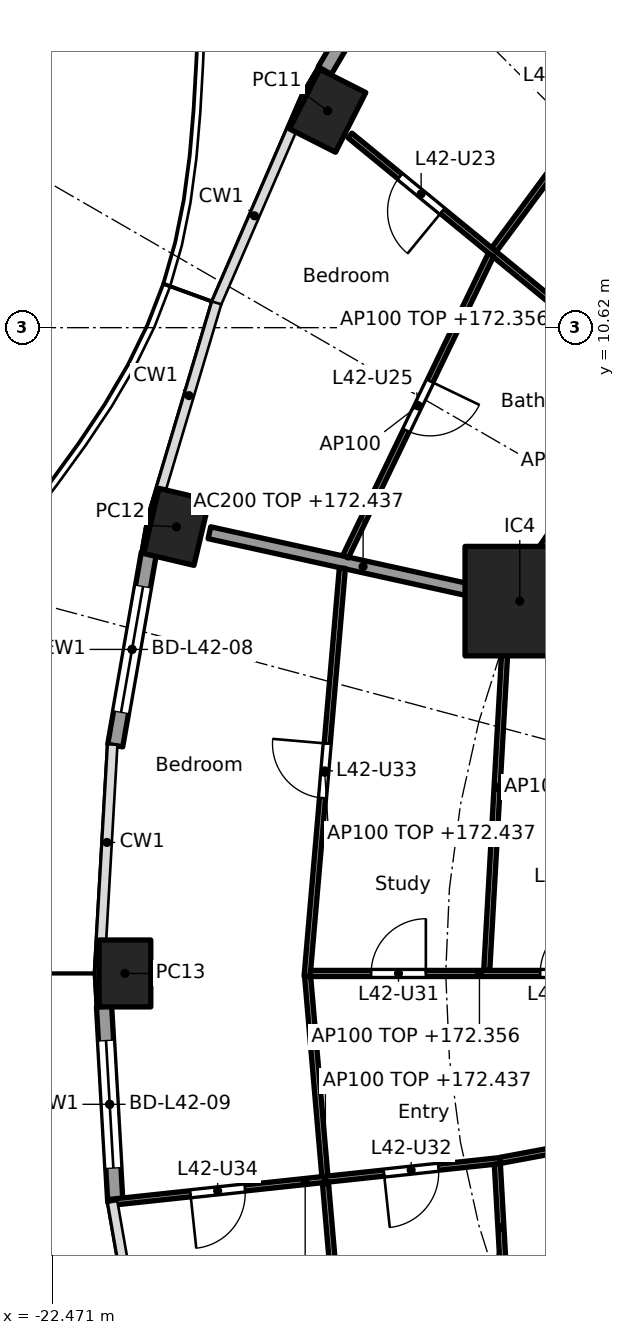
"""IFC4 building model, lengths in metres.
Left out: names, types, materials, properties, quantities, classifications, styles, units other than length and angle.
Written with IfcOpenShell. Run it as: python <this file> out.ifc"""

import sys

from ifc_helpers import new_model, si_unit, direction, frame, frame_2d, origin, origin_2d, place, context, subcontext, project, spatial, rectangle, hollow_rectangle, extrude, element, fill, save


model = new_model("IFC4")
c1 = context("Model", 3, precision=1e-05, world=origin(), true_north=direction((0.0, 1.0)))
c2 = subcontext(c1, "Body", "Model", "MODEL_VIEW")
j1 = project(units=[si_unit("LENGTHUNIT", "METRE"), si_unit("PLANEANGLEUNIT", "RADIAN")], contexts=[c1])
p1 = place(None, origin())
s1 = spatial("IfcSite", under=j1, at=p1, CompositionType="ELEMENT")
p2 = place(p1, origin())
s2 = spatial("IfcBuilding", under=s1, at=p2, CompositionType="ELEMENT")
p3 = place(p2, frame((0.0, 0.0, 169.6)))
s3 = spatial("IfcBuildingStorey", under=s2, at=p3, CompositionType="ELEMENT", Elevation=169.6)
for number, where, z_axis, x_axis in (
    (1, (-17.942, 14.188, 0.0), (0.0, 0.0, 1.0), (-0.452, -0.892, 0.0)),
    (2, (-20.427, 7.344, 0.0), (0.0, 0.0, 1.0), (-0.229, -0.973, 0.0)),
    (3, (-21.275, 0.0, 0.0), (0.0, 0.0, 1.0), (0.0, -1.0, 0.0)),
):
    element("IfcColumn", number, at=place(p3, frame(where, z_axis=z_axis, x_axis=x_axis)), inside=s3, PredefinedType="COLUMN", context=c2, shape_type="SweptSolid", body=[
        extrude(hollow_rectangle(XDim=1.1, YDim=0.85, WallThickness=0.036, at=origin_2d()), origin(), (0.0, 0.0, 1.0), 3.7),
    ])
p4 = place(p3, frame((-14.782, 6.123, 0.0), z_axis=(0.0, 0.0, 1.0), x_axis=(1.0, 0.0, 0.0)))
e4 = element("IfcColumn", 4, at=p4, inside=s3, PredefinedType="COLUMN", context=c2, shape_type="SweptSolid", body=[
    extrude(rectangle(XDim=1.8, YDim=1.8, at=origin_2d()), origin(), (0.0, 0.0, 1.0), 3.7),
])
p5 = place(p3, frame((-17.989, 14.848, 0.0), z_axis=(0.0, 0.0, 1.0), x_axis=(0.506309086483, 0.862352079458, 0.0)))
e5 = element("IfcWall", 5, at=p5, inside=s3, PredefinedType="SOLIDWALL", context=c2, shape_type="SweptSolid", body=[
    extrude(rectangle(XDim=3.092, YDim=0.25, at=frame_2d((1.546, 0.0))), origin(), (0.0, 0.0, 1.0), 3.44),
])
p6 = place(p5, frame((0.496, 0.0, 0.0)))
e6 = element("IfcOpeningElement", 6, at=p6, cuts=e5, PredefinedType="OPENING", context=c2, shape_type="SweptSolid", body=[
    extrude(rectangle(XDim=2.1, YDim=2.4, at=frame_2d((1.05, 1.2))), frame((0.0, 0.135, 0.0), z_axis=(0.0, -1.0, 0.0), x_axis=(1.0, 0.0, 0.0)), (0.0, 0.0, 1.0), 0.27),
])
p7 = place(p3, frame((-21.435, 3.747, 0.0), z_axis=(0.0, 0.0, 1.0), x_axis=(0.172223552479, 0.98505789067, 0.0)))
e7 = element("IfcWall", 7, at=p7, inside=s3, PredefinedType="SOLIDWALL", context=c2, shape_type="SweptSolid", body=[
    extrude(rectangle(XDim=3.211, YDim=0.25, at=frame_2d((1.605, 0.0))), origin(), (0.0, 0.0, 1.0), 3.44),
])
p8 = place(p7, frame((0.555, 0.0, 0.0)))
e8 = element("IfcOpeningElement", 8, at=p8, cuts=e7, PredefinedType="OPENING", context=c2, shape_type="SweptSolid", body=[
    extrude(rectangle(XDim=2.1, YDim=2.4, at=frame_2d((1.05, 1.2))), frame((0.0, 0.135, 0.0), z_axis=(0.0, -1.0, 0.0), x_axis=(1.0, 0.0, 0.0)), (0.0, 0.0, 1.0), 0.27),
])
p9 = place(p3, frame((-21.433, -3.762, 0.0), z_axis=(0.0, 0.0, 1.0), x_axis=(-0.057532692854, 0.998343622834, 0.0)))
e9 = element("IfcWall", 9, at=p9, inside=s3, PredefinedType="SOLIDWALL", context=c2, shape_type="SweptSolid", body=[
    extrude(rectangle(XDim=3.225, YDim=0.25, at=frame_2d((1.613, 0.0))), origin(), (0.0, 0.0, 1.0), 3.44),
])
p10 = place(p9, frame((0.562, 0.0, 0.0)))
e10 = element("IfcOpeningElement", 10, at=p10, cuts=e9, PredefinedType="OPENING", context=c2, shape_type="SweptSolid", body=[
    extrude(rectangle(XDim=2.1, YDim=2.4, at=frame_2d((1.05, 1.2))), frame((0.0, 0.135, 0.0), z_axis=(0.0, -1.0, 0.0), x_axis=(1.0, 0.0, 0.0)), (0.0, 0.0, 1.0), 0.27),
])
p11 = place(p3, frame((-12.657, 5.243, 0.0), z_axis=(0.0, 0.0, 1.0), x_axis=(-0.923859888513, 0.38273085373, 0.0)))
e11 = element("IfcWall", 11, at=p11, inside=s3, PredefinedType="PARTITIONING", context=c2, shape_type="SweptSolid", body=[
    extrude(rectangle(XDim=2.199, YDim=0.2, at=frame_2d((1.1, 0.0))), origin(), (0.0, 0.0, 1.0), 3.44),
])
p12 = place(p3, frame((-14.831, 6.134, 0.0), z_axis=(0.0, 0.0, 1.0), x_axis=(-0.976568396888, 0.215207263354, 0.0)))
e12 = element("IfcWall", 12, at=p12, inside=s3, PredefinedType="PARTITIONING", context=c2, shape_type="SweptSolid", body=[
    extrude(rectangle(XDim=5.177, YDim=0.2, at=frame_2d((2.588, 0.0))), origin(), (0.0, 0.0, 1.0), 2.837),
])
p13 = place(p3, frame((-11.773, 16.542, 0.0), z_axis=(0.0, 0.0, 1.0), x_axis=(-0.594694305999, -0.803951915485, 0.0)))
e13 = element("IfcWall", 13, at=p13, inside=s3, PredefinedType="PARTITIONING", context=c2, shape_type="SweptSolid", body=[
    extrude(rectangle(XDim=5.772, YDim=0.1, at=frame_2d((2.886, 0.0))), origin(), (0.0, 0.0, 1.0), 2.837),
])
p14 = place(p13, frame((2.461, 0.0, 0.0)))
e14 = element("IfcOpeningElement", 14, at=p14, cuts=e13, PredefinedType="OPENING", context=c2, shape_type="SweptSolid", body=[
    extrude(rectangle(XDim=0.9, YDim=2.1, at=frame_2d((0.45, 1.05))), frame((0.0, 0.06, 0.0), z_axis=(0.0, -1.0, 0.0), x_axis=(1.0, 0.0, 0.0)), (0.0, 0.0, 1.0), 0.12),
])
p15 = place(p3, frame((-10.189, 7.721, 0.0), z_axis=(0.0, 0.0, 1.0), x_axis=(-0.773134429339, 0.634242188892, 0.0)))
e15 = element("IfcWall", 15, at=p15, inside=s3, PredefinedType="PARTITIONING", context=c2, shape_type="SweptSolid", body=[
    extrude(rectangle(XDim=9.552, YDim=0.1, at=frame_2d((4.776, 0.0))), origin(), (0.0, 0.0, 1.0), 2.756),
])
p16 = place(p15, frame((7.59, 0.0, 0.0)))
e16 = element("IfcOpeningElement", 16, at=p16, cuts=e15, PredefinedType="OPENING", context=c2, shape_type="SweptSolid", body=[
    extrude(rectangle(XDim=0.9, YDim=2.1, at=frame_2d((0.45, 1.05))), frame((0.0, 0.06, 0.0), z_axis=(0.0, -1.0, 0.0), x_axis=(1.0, 0.0, 0.0)), (0.0, 0.0, 1.0), 0.12),
])
p17 = place(p15, frame((1.104, 0.0, 0.0)))
e17 = element("IfcOpeningElement", 17, at=p17, cuts=e15, PredefinedType="OPENING", context=c2, shape_type="SweptSolid", body=[
    extrude(rectangle(XDim=0.9, YDim=2.1, at=frame_2d((0.45, 1.05))), frame((0.0, 0.06, 0.0), z_axis=(0.0, -1.0, 0.0), x_axis=(1.0, 0.0, 0.0)), (0.0, 0.0, 1.0), 0.12),
])
p18 = place(p3, frame((-12.619, 9.65, 0.0), z_axis=(0.0, 0.0, 1.0), x_axis=(-0.561046521684, -0.82778427172, 0.0)))
e18 = element("IfcWall", 18, at=p18, inside=s3, PredefinedType="PARTITIONING", context=c2, shape_type="SweptSolid", body=[
    extrude(rectangle(XDim=4.109, YDim=0.1, at=frame_2d((2.054, 0.0))), origin(), (0.0, 0.0, 1.0), 3.44),
])
p19 = place(p3, frame((-15.257, 11.816, 0.0), z_axis=(0.0, 0.0, 1.0), x_axis=(-0.434027506504, -0.900899619046, 0.0)))
e19 = element("IfcWall", 19, at=p19, inside=s3, PredefinedType="PARTITIONING", context=c2, shape_type="SweptSolid", body=[
    extrude(rectangle(XDim=5.508, YDim=0.1, at=frame_2d((2.754, 0.0))), origin(), (0.0, 0.0, 1.0), 3.44),
])
p20 = place(p19, frame((2.304, 0.0, 0.0)))
e20 = element("IfcOpeningElement", 20, at=p20, cuts=e19, PredefinedType="OPENING", context=c2, shape_type="SweptSolid", body=[
    extrude(rectangle(XDim=0.9, YDim=2.1, at=frame_2d((0.45, 1.05))), frame((0.0, 0.06, 0.0), z_axis=(0.0, -1.0, 0.0), x_axis=(1.0, 0.0, 0.0)), (0.0, 0.0, 1.0), 0.12),
])
p21 = place(p3, frame((-14.986, 6.067, 0.0), z_axis=(0.0, 0.0, 1.0), x_axis=(-0.056311398802, -0.998413254302, 0.0)))
e21 = element("IfcWall", 21, at=p21, inside=s3, PredefinedType="PARTITIONING", context=c2, shape_type="SweptSolid", body=[
    extrude(rectangle(XDim=6.026, YDim=0.1, at=frame_2d((3.013, 0.0))), origin(), (0.0, 0.0, 1.0), 2.837),
])
p22 = place(p3, frame((-17.7, 6.664, 0.0), z_axis=(0.0, 0.0, 1.0), x_axis=(-0.086004282666, -0.996294767307, 0.0)))
e22 = element("IfcWall", 22, at=p22, inside=s3, PredefinedType="PARTITIONING", context=c2, shape_type="SweptSolid", body=[
    extrude(rectangle(XDim=6.739, YDim=0.1, at=frame_2d((3.37, 0.0))), origin(), (0.0, 0.0, 1.0), 2.837),
])
p23 = place(p22, frame((2.895, 0.0, 0.0)))
e23 = element("IfcOpeningElement", 23, at=p23, cuts=e22, PredefinedType="OPENING", context=c2, shape_type="SweptSolid", body=[
    extrude(rectangle(XDim=0.9, YDim=2.1, at=frame_2d((0.45, 1.05))), frame((0.0, 0.06, 0.0), z_axis=(0.0, -1.0, 0.0), x_axis=(1.0, 0.0, 0.0)), (0.0, 0.0, 1.0), 0.12),
])
p24 = place(p3, frame((-12.665, 0.0, 0.0), z_axis=(0.0, 0.0, 1.0), x_axis=(-1.0, 0.0, 0.0)))
e24 = element("IfcWall", 24, at=p24, inside=s3, PredefinedType="PARTITIONING", context=c2, shape_type="SweptSolid", body=[
    extrude(rectangle(XDim=5.56, YDim=0.1, at=frame_2d((2.78, 0.0))), origin(), (0.0, 0.0, 1.0), 2.756),
])
p25 = place(p24, frame((0.882, 0.0, 0.0)))
e25 = element("IfcOpeningElement", 25, at=p25, cuts=e24, PredefinedType="OPENING", context=c2, shape_type="SweptSolid", body=[
    extrude(rectangle(XDim=0.9, YDim=2.1, at=frame_2d((0.45, 1.05))), frame((0.0, 0.06, 0.0), z_axis=(0.0, -1.0, 0.0), x_axis=(1.0, 0.0, 0.0)), (0.0, 0.0, 1.0), 0.12),
])
p26 = place(p24, frame((3.662, 0.0, 0.0)))
e26 = element("IfcOpeningElement", 26, at=p26, cuts=e24, PredefinedType="OPENING", context=c2, shape_type="SweptSolid", body=[
    extrude(rectangle(XDim=0.9, YDim=2.1, at=frame_2d((0.45, 1.05))), frame((0.0, 0.06, 0.0), z_axis=(0.0, -1.0, 0.0), x_axis=(1.0, 0.0, 0.0)), (0.0, 0.0, 1.0), 0.12),
])
p27 = place(p3, frame((-18.271, -0.05, 0.0), z_axis=(0.0, 0.0, 1.0), x_axis=(0.086018199227, -0.996293565874, 0.0)))
e27 = element("IfcWall", 27, at=p27, inside=s3, PredefinedType="PARTITIONING", context=c2, shape_type="SweptSolid", body=[
    extrude(rectangle(XDim=6.789, YDim=0.1, at=frame_2d((3.395, 0.0))), origin(), (0.0, 0.0, 1.0), 2.837),
])
p28 = place(p3, frame((-12.663, -2.621, 0.0), z_axis=(0.0, 0.0, 1.0), x_axis=(-0.983176884312, -0.182655999505, 0.0)))
e28 = element("IfcWall", 28, at=p28, inside=s3, PredefinedType="PARTITIONING", context=c2, shape_type="SweptSolid", body=[
    extrude(rectangle(XDim=2.483, YDim=0.1, at=frame_2d((1.242, 0.0))), origin(), (0.0, 0.0, 1.0), 2.756),
])
p29 = place(p28, frame((0.792, 0.0, 0.0)))
e29 = element("IfcOpeningElement", 29, at=p29, cuts=e28, PredefinedType="OPENING", context=c2, shape_type="SweptSolid", body=[
    extrude(rectangle(XDim=0.9, YDim=2.1, at=frame_2d((0.45, 1.05))), frame((0.0, 0.06, 0.0), z_axis=(0.0, -1.0, 0.0), x_axis=(1.0, 0.0, 0.0)), (0.0, 0.0, 1.0), 0.12),
])
p30 = place(p3, frame((-15.104, -3.078, 0.0), z_axis=(0.0, 0.0, 1.0), x_axis=(-0.994316167803, -0.106467640365, 0.0)))
e30 = element("IfcWall", 30, at=p30, inside=s3, PredefinedType="PARTITIONING", context=c2, shape_type="SweptSolid", body=[
    extrude(rectangle(XDim=6.45, YDim=0.1, at=frame_2d((3.225, 0.0))), origin(), (0.0, 0.0, 1.0), 2.905),
])
p31 = place(p30, frame((1.022, 0.0, 0.0)))
e31 = element("IfcOpeningElement", 31, at=p31, cuts=e30, PredefinedType="OPENING", context=c2, shape_type="SweptSolid", body=[
    extrude(rectangle(XDim=0.9, YDim=2.1, at=frame_2d((0.45, 1.05))), frame((0.0, 0.06, 0.0), z_axis=(0.0, -1.0, 0.0), x_axis=(1.0, 0.0, 0.0)), (0.0, 0.0, 1.0), 0.12),
])
p32 = place(p30, frame((4.223, 0.0, 0.0)))
e32 = element("IfcOpeningElement", 32, at=p32, cuts=e30, PredefinedType="OPENING", context=c2, shape_type="SweptSolid", body=[
    extrude(rectangle(XDim=0.9, YDim=2.1, at=frame_2d((0.45, 1.05))), frame((0.0, 0.06, 0.0), z_axis=(0.0, -1.0, 0.0), x_axis=(1.0, 0.0, 0.0)), (0.0, 0.0, 1.0), 0.12),
])
p33 = place(p3, frame((-15.151, -3.133, 0.0), z_axis=(0.0, 0.0, 1.0), x_axis=(0.05637501378, -0.998409664327, 0.0)))
e33 = element("IfcWall", 33, at=p33, inside=s3, PredefinedType="PARTITIONING", context=c2, shape_type="SweptSolid", body=[
    extrude(rectangle(XDim=2.988, YDim=0.1, at=frame_2d((1.494, 0.0))), origin(), (0.0, 0.0, 1.0), 2.837),
])
p34 = place(p8, origin())
e34 = element("IfcDoor", 34, at=p34, inside=s3, OperationType="SLIDING_TO_LEFT", PredefinedType="DOOR", context=c2, shape_type="SweptSolid", body=[
    extrude(rectangle(XDim=2.1, YDim=2.4, at=frame_2d((1.05, 1.2))), frame((0.0, 0.025, 0.0), z_axis=(0.0, -1.0, 0.0), x_axis=(1.0, 0.0, 0.0)), (0.0, 0.0, 1.0), 0.05),
])
fill(e8, e34)
p35 = place(p10, origin())
e35 = element("IfcDoor", 35, at=p35, inside=s3, OperationType="SLIDING_TO_LEFT", PredefinedType="DOOR", context=c2, shape_type="SweptSolid", body=[
    extrude(rectangle(XDim=2.1, YDim=2.4, at=frame_2d((1.05, 1.2))), frame((0.0, 0.025, 0.0), z_axis=(0.0, -1.0, 0.0), x_axis=(1.0, 0.0, 0.0)), (0.0, 0.0, 1.0), 0.05),
])
fill(e10, e35)
p36 = place(p16, origin())
e36 = element("IfcDoor", 36, at=p36, inside=s3, OperationType="SINGLE_SWING_LEFT", PredefinedType="DOOR", context=c2, shape_type="SweptSolid", body=[
    extrude(rectangle(XDim=0.9, YDim=2.1, at=frame_2d((0.45, 1.05))), frame((0.0, 0.025, 0.0), z_axis=(0.0, -1.0, 0.0), x_axis=(1.0, 0.0, 0.0)), (0.0, 0.0, 1.0), 0.05),
])
fill(e16, e36)
p37 = place(p20, origin())
e37 = element("IfcDoor", 37, at=p37, inside=s3, OperationType="SINGLE_SWING_LEFT", PredefinedType="DOOR", context=c2, shape_type="SweptSolid", body=[
    extrude(rectangle(XDim=0.9, YDim=2.1, at=frame_2d((0.45, 1.05))), frame((0.0, 0.025, 0.0), z_axis=(0.0, -1.0, 0.0), x_axis=(1.0, 0.0, 0.0)), (0.0, 0.0, 1.0), 0.05),
])
fill(e20, e37)
p38 = place(p25, frame((0.9, 0.0, 0.0), x_axis=(-1.0, 0.0, 0.0)))
e38 = element("IfcDoor", 38, at=p38, inside=s3, OperationType="SINGLE_SWING_RIGHT", PredefinedType="DOOR", context=c2, shape_type="SweptSolid", body=[
    extrude(rectangle(XDim=0.9, YDim=2.1, at=frame_2d((0.45, 1.05))), frame((0.0, 0.025, 0.0), z_axis=(0.0, -1.0, 0.0), x_axis=(1.0, 0.0, 0.0)), (0.0, 0.0, 1.0), 0.05),
])
fill(e25, e38)
p39 = place(p26, frame((0.9, 0.0, 0.0), x_axis=(-1.0, 0.0, 0.0)))
e39 = element("IfcDoor", 39, at=p39, inside=s3, OperationType="SINGLE_SWING_RIGHT", PredefinedType="DOOR", context=c2, shape_type="SweptSolid", body=[
    extrude(rectangle(XDim=0.9, YDim=2.1, at=frame_2d((0.45, 1.05))), frame((0.0, 0.025, 0.0), z_axis=(0.0, -1.0, 0.0), x_axis=(1.0, 0.0, 0.0)), (0.0, 0.0, 1.0), 0.05),
])
fill(e26, e39)
p40 = place(p31, origin())
e40 = element("IfcDoor", 40, at=p40, inside=s3, OperationType="SINGLE_SWING_RIGHT", PredefinedType="DOOR", context=c2, shape_type="SweptSolid", body=[
    extrude(rectangle(XDim=0.9, YDim=2.1, at=frame_2d((0.45, 1.05))), frame((0.0, 0.025, 0.0), z_axis=(0.0, -1.0, 0.0), x_axis=(1.0, 0.0, 0.0)), (0.0, 0.0, 1.0), 0.05),
])
fill(e31, e40)
p41 = place(p23, frame((0.9, 0.0, 0.0), x_axis=(-1.0, 0.0, 0.0)))
e41 = element("IfcDoor", 41, at=p41, inside=s3, OperationType="SINGLE_SWING_RIGHT", PredefinedType="DOOR", context=c2, shape_type="SweptSolid", body=[
    extrude(rectangle(XDim=0.9, YDim=2.1, at=frame_2d((0.45, 1.05))), frame((0.0, 0.025, 0.0), z_axis=(0.0, -1.0, 0.0), x_axis=(1.0, 0.0, 0.0)), (0.0, 0.0, 1.0), 0.05),
])
fill(e23, e41)
p42 = place(p32, origin())
e42 = element("IfcDoor", 42, at=p42, inside=s3, OperationType="SINGLE_SWING_RIGHT", PredefinedType="DOOR", context=c2, shape_type="SweptSolid", body=[
    extrude(rectangle(XDim=0.9, YDim=2.1, at=frame_2d((0.45, 1.05))), frame((0.0, 0.025, 0.0), z_axis=(0.0, -1.0, 0.0), x_axis=(1.0, 0.0, 0.0)), (0.0, 0.0, 1.0), 0.05),
])
fill(e32, e42)
save(model, sys.argv[1])
